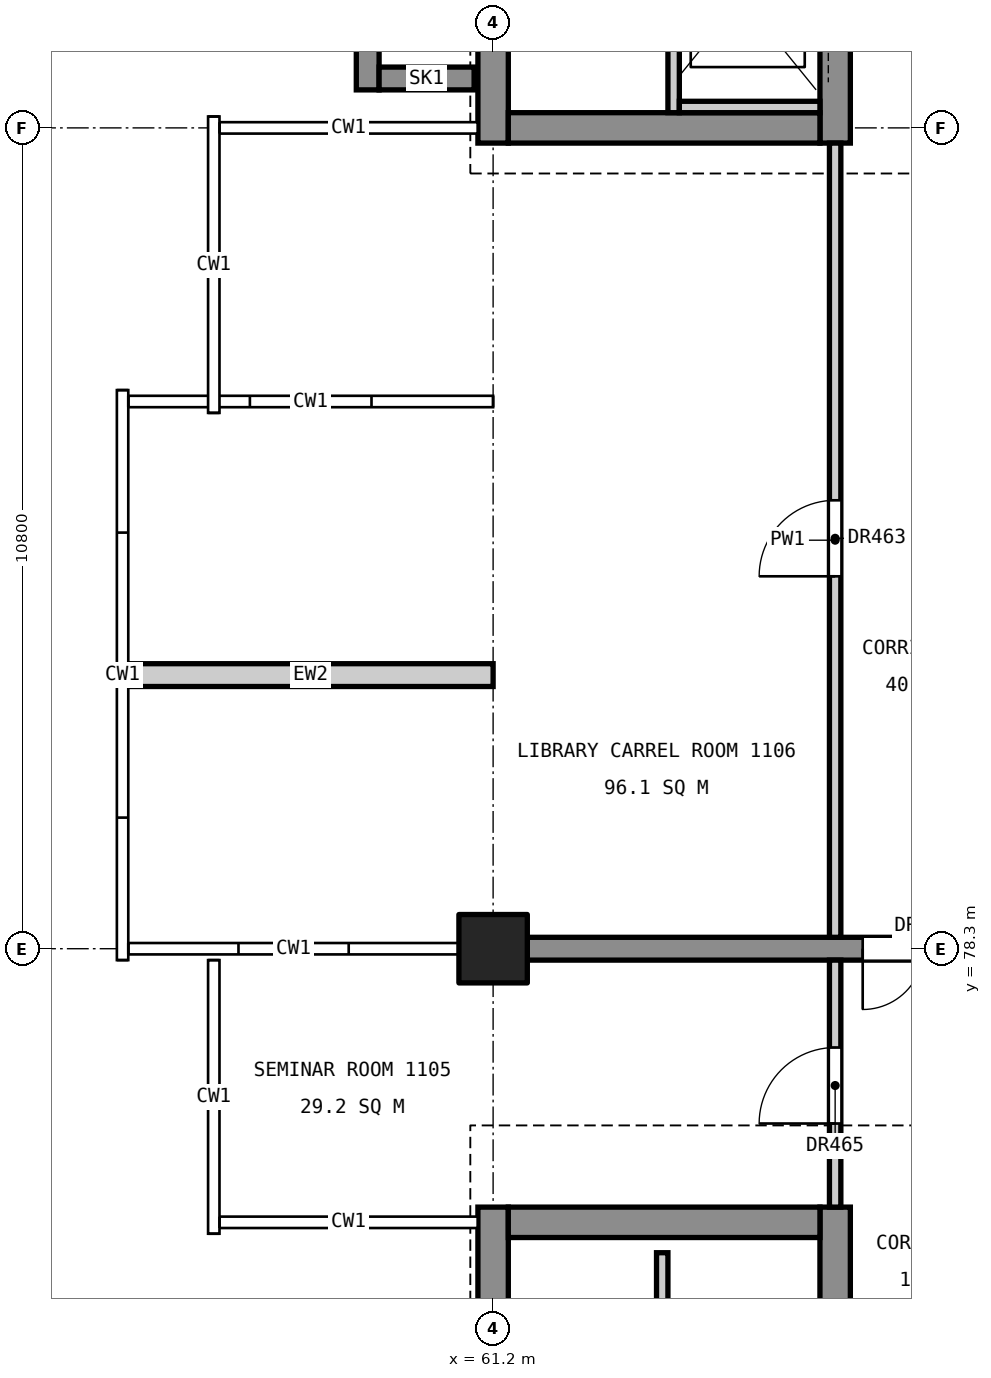
"""IFC4 building model, lengths in metres.
Left out: names, types, materials, properties, quantities, classifications, styles, units other than length and angle.
Written with IfcOpenShell. Run it as: python <this file> out.ifc"""

import sys

from ifc_helpers import new_model, si_unit, direction, frame, frame_2d, origin, origin_2d, place, context, subcontext, project, spatial, rectangle, extrude, element, fill, save


model = new_model("IFC4")
c1 = context("Model", 3, precision=1e-05, world=origin(), true_north=direction((0.0, 1.0)))
c2 = subcontext(c1, "Body", "Model", "MODEL_VIEW")
j1 = project(units=[si_unit("LENGTHUNIT", "METRE"), si_unit("PLANEANGLEUNIT", "RADIAN")], contexts=[c1])
p1 = place(None, origin())
s1 = spatial("IfcSite", under=j1, at=p1, CompositionType="ELEMENT")
p2 = place(p1, origin())
s2 = spatial("IfcBuilding", under=s1, at=p2, CompositionType="ELEMENT")
p3 = place(p2, frame((0.0, 0.0, 55.8)))
s3 = spatial("IfcBuildingStorey", under=s2, at=p3, CompositionType="ELEMENT", Elevation=55.8)
p4 = place(p3, frame((61.2, 78.3, 0.0), z_axis=(0.0, 0.0, 1.0), x_axis=(1.0, 0.0, 0.0)))
e1 = element("IfcColumn", 1, at=p4, inside=s3, PredefinedType="COLUMN", context=c2, shape_type="SweptSolid", body=[
    extrude(rectangle(XDim=0.9, YDim=0.9, at=origin_2d()), origin(), (0.0, 0.0, 1.0), 4.8),
])
p5 = place(p3, frame((61.2, 60.1, 0.0), z_axis=(0.0, 0.0, 1.0), x_axis=(0.0, 1.0, 0.0)))
e2 = element("IfcWall", 2, at=p5, inside=s3, PredefinedType="SHEAR", context=c2, shape_type="SweptSolid", body=[
    extrude(rectangle(XDim=14.8, YDim=0.4, at=frame_2d((7.4, 0.0))), origin(), (0.0, 0.0, 1.0), 4.55),
])
p6 = place(p5, frame((6.11, 0.0, 3.4)))
e3 = element("IfcOpeningElement", 3, at=p6, cuts=e2, PredefinedType="OPENING", context=c2, shape_type="SweptSolid", body=[
    extrude(rectangle(XDim=1.2, YDim=0.9, at=frame_2d((0.6, 0.45))), frame((0.0, 0.21, 0.0), z_axis=(0.0, -1.0, 0.0), x_axis=(1.0, 0.0, 0.0)), (0.0, 0.0, 1.0), 0.42),
])
p7 = place(p3, frame((65.7, 60.1, 0.0), z_axis=(0.0, 0.0, 1.0), x_axis=(0.0, 1.0, 0.0)))
e4 = element("IfcWall", 4, at=p7, inside=s3, PredefinedType="SHEAR", context=c2, shape_type="SweptSolid", body=[
    extrude(rectangle(XDim=14.8, YDim=0.4, at=frame_2d((7.4, 0.0))), origin(), (0.0, 0.0, 1.0), 4.55),
])
p8 = place(p7, frame((0.5, 0.0, 0.0)))
e5 = element("IfcOpeningElement", 5, at=p8, cuts=e4, PredefinedType="OPENING", context=c2, shape_type="SweptSolid", body=[
    extrude(rectangle(XDim=1.4, YDim=2.1, at=frame_2d((0.7, 1.05))), frame((0.0, 0.21, 0.0), z_axis=(0.0, -1.0, 0.0), x_axis=(1.0, 0.0, 0.0)), (0.0, 0.0, 1.0), 0.42),
])
p9 = place(p7, frame((8.8, 0.0, 0.0)))
e6 = element("IfcOpeningElement", 6, at=p9, cuts=e4, PredefinedType="OPENING", context=c2, shape_type="SweptSolid", body=[
    extrude(rectangle(XDim=1.1, YDim=2.1, at=frame_2d((0.55, 1.05))), frame((0.0, 0.21, 0.0), z_axis=(0.0, -1.0, 0.0), x_axis=(1.0, 0.0, 0.0)), (0.0, 0.0, 1.0), 0.42),
])
p10 = place(p7, frame((11.35, 0.0, 0.0)))
e7 = element("IfcOpeningElement", 7, at=p10, cuts=e4, PredefinedType="OPENING", context=c2, shape_type="SweptSolid", body=[
    extrude(rectangle(XDim=1.1, YDim=2.1, at=frame_2d((0.55, 1.05))), frame((0.0, 0.21, 0.0), z_axis=(0.0, -1.0, 0.0), x_axis=(1.0, 0.0, 0.0)), (0.0, 0.0, 1.0), 0.42),
])
p11 = place(p3, frame((61.4, 74.7, 0.0), z_axis=(0.0, 0.0, 1.0), x_axis=(1.0, 0.0, 0.0)))
e8 = element("IfcWall", 8, at=p11, inside=s3, PredefinedType="SHEAR", context=c2, shape_type="SweptSolid", body=[
    extrude(rectangle(XDim=4.1, YDim=0.4, at=frame_2d((2.05, 0.0))), origin(), (0.0, 0.0, 1.0), 4.55),
])
p12 = place(p3, frame((61.2, 88.9, 0.0), z_axis=(0.0, 0.0, 1.0), x_axis=(0.0, 1.0, 0.0)))
e9 = element("IfcWall", 9, at=p12, inside=s3, PredefinedType="SHEAR", context=c2, shape_type="SweptSolid", body=[
    extrude(rectangle(XDim=11.2, YDim=0.4, at=frame_2d((5.6, 0.0))), origin(), (0.0, 0.0, 1.0), 4.55),
])
p13 = place(p12, frame((3.89, 0.0, 3.4)))
e10 = element("IfcOpeningElement", 10, at=p13, cuts=e9, PredefinedType="OPENING", context=c2, shape_type="SweptSolid", body=[
    extrude(rectangle(XDim=1.2, YDim=0.9, at=frame_2d((0.6, 0.45))), frame((0.0, 0.21, 0.0), z_axis=(0.0, -1.0, 0.0), x_axis=(1.0, 0.0, 0.0)), (0.0, 0.0, 1.0), 0.42),
])
p14 = place(p3, frame((65.7, 88.9, 0.0), z_axis=(0.0, 0.0, 1.0), x_axis=(0.0, 1.0, 0.0)))
e11 = element("IfcWall", 11, at=p14, inside=s3, PredefinedType="SHEAR", context=c2, shape_type="SweptSolid", body=[
    extrude(rectangle(XDim=11.2, YDim=0.4, at=frame_2d((5.6, 0.0))), origin(), (0.0, 0.0, 1.0), 4.55),
])
p15 = place(p14, frame((9.3, 0.0, 0.0)))
e12 = element("IfcOpeningElement", 12, at=p15, cuts=e11, PredefinedType="OPENING", context=c2, shape_type="SweptSolid", body=[
    extrude(rectangle(XDim=1.4, YDim=2.1, at=frame_2d((0.7, 1.05))), frame((0.0, 0.21, 0.0), z_axis=(0.0, -1.0, 0.0), x_axis=(1.0, 0.0, 0.0)), (0.0, 0.0, 1.0), 0.42),
])
p16 = place(p14, frame((1.35, 0.0, 0.0)))
e13 = element("IfcOpeningElement", 13, at=p16, cuts=e11, PredefinedType="OPENING", context=c2, shape_type="SweptSolid", body=[
    extrude(rectangle(XDim=1.1, YDim=2.1, at=frame_2d((0.55, 1.05))), frame((0.0, 0.21, 0.0), z_axis=(0.0, -1.0, 0.0), x_axis=(1.0, 0.0, 0.0)), (0.0, 0.0, 1.0), 0.42),
])
p17 = place(p3, frame((61.4, 89.1, 0.0), z_axis=(0.0, 0.0, 1.0), x_axis=(1.0, 0.0, 0.0)))
e14 = element("IfcWall", 14, at=p17, inside=s3, PredefinedType="SHEAR", context=c2, shape_type="SweptSolid", body=[
    extrude(rectangle(XDim=4.1, YDim=0.4, at=frame_2d((2.05, 0.0))), origin(), (0.0, 0.0, 1.0), 4.55),
])
p18 = place(p3, frame((59.55, 89.6, 0.0), z_axis=(0.0, 0.0, 1.0), x_axis=(0.0, 1.0, 0.0)))
e15 = element("IfcWall", 15, at=p18, inside=s3, PredefinedType="SHEAR", context=c2, shape_type="SweptSolid", body=[
    extrude(rectangle(XDim=2.4, YDim=0.3, at=frame_2d((1.2, 0.0))), origin(), (0.0, 0.0, 1.0), 4.8),
])
p19 = place(p3, frame((60.95, 89.75, 0.0), z_axis=(0.0, 0.0, 1.0), x_axis=(-1.0, 0.0, 0.0)))
e16 = element("IfcWall", 16, at=p19, inside=s3, PredefinedType="SHEAR", context=c2, shape_type="SweptSolid", body=[
    extrude(rectangle(XDim=1.25, YDim=0.3, at=frame_2d((0.625, 0.0))), origin(), (0.0, 0.0, 1.0), 4.8),
])
p20 = place(p3, frame((61.65, 78.3, 0.0), z_axis=(0.0, 0.0, 1.0), x_axis=(1.0, 0.0, 0.0)))
e17 = element("IfcWall", 17, at=p20, inside=s3, PredefinedType="SHEAR", context=c2, shape_type="SweptSolid", body=[
    extrude(rectangle(XDim=6.3, YDim=0.3, at=frame_2d((3.15, 0.0))), origin(), (0.0, 0.0, 1.0), 4.55),
])
p21 = place(p20, frame((4.413, 0.0, 0.0)))
e18 = element("IfcOpeningElement", 18, at=p21, cuts=e17, PredefinedType="OPENING", context=c2, shape_type="SweptSolid", body=[
    extrude(rectangle(XDim=1.6, YDim=2.1, at=frame_2d((0.8, 1.05))), frame((0.0, 0.16, 0.0), z_axis=(0.0, -1.0, 0.0), x_axis=(1.0, 0.0, 0.0)), (0.0, 0.0, 1.0), 0.32),
])
p22 = place(p3, frame((63.575, 92.0, 0.0), z_axis=(0.0, 0.0, 1.0), x_axis=(0.0, -1.0, 0.0)))
e19 = element("IfcWall", 19, at=p22, inside=s3, PredefinedType="SOLIDWALL", context=c2, shape_type="SweptSolid", body=[
    extrude(rectangle(XDim=2.7, YDim=0.15, at=frame_2d((1.35, 0.0))), origin(), (0.0, 0.0, 1.0), 4.8),
])
p23 = place(p3, frame((63.65, 89.375, 0.0), z_axis=(0.0, 0.0, 1.0), x_axis=(1.0, 0.0, 0.0)))
e20 = element("IfcWall", 20, at=p23, inside=s3, PredefinedType="SOLIDWALL", context=c2, shape_type="SweptSolid", body=[
    extrude(rectangle(XDim=1.85, YDim=0.15, at=frame_2d((0.925, 0.0))), origin(), (0.0, 0.0, 1.0), 4.8),
])
p24 = place(p3, frame((63.425, 73.3, 0.0), z_axis=(0.0, 0.0, 1.0), x_axis=(0.0, 1.0, 0.0)))
e21 = element("IfcWall", 21, at=p24, inside=s3, PredefinedType="SOLIDWALL", context=c2, shape_type="SweptSolid", body=[
    extrude(rectangle(XDim=1.0, YDim=0.15, at=frame_2d((0.5, 0.0))), origin(), (0.0, 0.0, 1.0), 4.8),
])
p25 = place(p3, frame((56.4, 81.9, 0.0), z_axis=(0.0, 0.0, 1.0), x_axis=(1.0, 0.0, 0.0)))
e22 = element("IfcWall", 22, at=p25, inside=s3, PredefinedType="STANDARD", context=c2, shape_type="SweptSolid", body=[
    extrude(rectangle(XDim=4.8, YDim=0.3, at=frame_2d((2.4, 0.0))), origin(), (0.0, 0.0, 1.0), 3.65),
])
p26 = place(p3, frame((65.7, 74.9, 0.0), z_axis=(0.0, 0.0, 1.0), x_axis=(0.0, 1.0, 0.0)))
e23 = element("IfcWall", 23, at=p26, inside=s3, PredefinedType="PARTITIONING", context=c2, shape_type="SweptSolid", body=[
    extrude(rectangle(XDim=3.25, YDim=0.15, at=frame_2d((1.625, 0.0))), origin(), (0.0, 0.0, 1.0), 3.55),
])
p27 = place(p26, frame((1.1, 0.0, 0.0)))
e24 = element("IfcOpeningElement", 24, at=p27, cuts=e23, PredefinedType="OPENING", context=c2, shape_type="SweptSolid", body=[
    extrude(rectangle(XDim=1.0, YDim=2.1, at=frame_2d((0.5, 1.05))), frame((0.0, 0.085, 0.0), z_axis=(0.0, -1.0, 0.0), x_axis=(1.0, 0.0, 0.0)), (0.0, 0.0, 1.0), 0.17),
])
p28 = place(p3, frame((65.7, 78.45, 0.0), z_axis=(0.0, 0.0, 1.0), x_axis=(0.0, 1.0, 0.0)))
e25 = element("IfcWall", 25, at=p28, inside=s3, PredefinedType="PARTITIONING", context=c2, shape_type="SweptSolid", body=[
    extrude(rectangle(XDim=10.45, YDim=0.15, at=frame_2d((5.225, 0.0))), origin(), (0.0, 0.0, 1.0), 3.55),
])
p29 = place(p28, frame((4.75, 0.0, 0.0)))
e26 = element("IfcOpeningElement", 26, at=p29, cuts=e25, PredefinedType="OPENING", context=c2, shape_type="SweptSolid", body=[
    extrude(rectangle(XDim=1.0, YDim=2.1, at=frame_2d((0.5, 1.05))), frame((0.0, 0.085, 0.0), z_axis=(0.0, -1.0, 0.0), x_axis=(1.0, 0.0, 0.0)), (0.0, 0.0, 1.0), 0.17),
])
p30 = place(p29, origin())
e27 = element("IfcDoor", 27, at=p30, inside=s3, OperationType="SINGLE_SWING_LEFT", PredefinedType="DOOR", context=c2, shape_type="SweptSolid", body=[
    extrude(rectangle(XDim=1.0, YDim=2.1, at=frame_2d((0.5, 1.05))), frame((0.0, 0.025, 0.0), z_axis=(0.0, -1.0, 0.0), x_axis=(1.0, 0.0, 0.0)), (0.0, 0.0, 1.0), 0.05),
])
fill(e26, e27)
p31 = place(p27, origin())
e28 = element("IfcDoor", 28, at=p31, inside=s3, OperationType="SINGLE_SWING_LEFT", PredefinedType="DOOR", context=c2, shape_type="SweptSolid", body=[
    extrude(rectangle(XDim=1.0, YDim=2.1, at=frame_2d((0.5, 1.05))), frame((0.0, 0.025, 0.0), z_axis=(0.0, -1.0, 0.0), x_axis=(1.0, 0.0, 0.0)), (0.0, 0.0, 1.0), 0.05),
])
fill(e24, e28)
p32 = place(p21, frame((1.6, 0.0, 0.0), z_axis=(0.0, 0.0, 1.0), x_axis=(-1.0, 0.0, 0.0)))
e29 = element("IfcDoor", 29, at=p32, inside=s3, OperationType="DOUBLE_DOOR_SINGLE_SWING", PredefinedType="DOOR", context=c2, shape_type="SweptSolid", body=[
    extrude(rectangle(XDim=1.6, YDim=2.1, at=frame_2d((0.8, 1.05))), frame((0.0, 0.025, 0.0), z_axis=(0.0, -1.0, 0.0), x_axis=(1.0, 0.0, 0.0)), (0.0, 0.0, 1.0), 0.05),
])
fill(e18, e29)
save(model, sys.argv[1])
